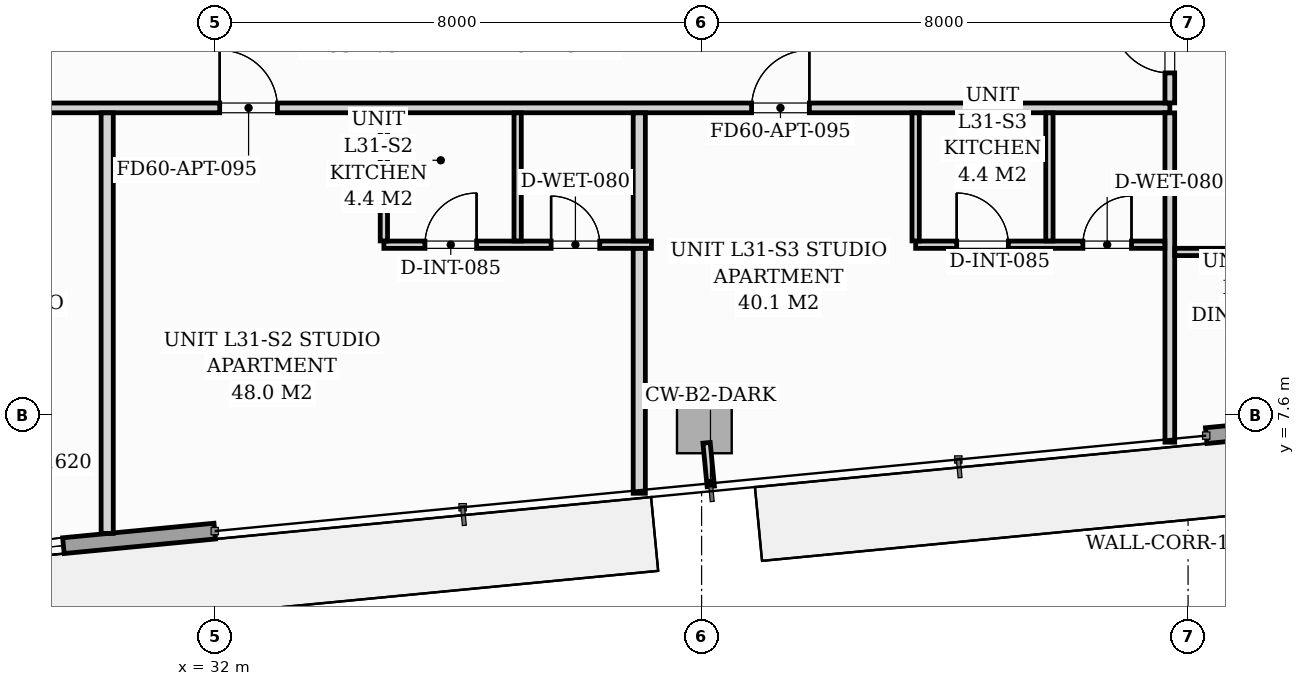
"""IFC4 building model, lengths in metres.
Left out: names, types, materials, properties, quantities, classifications, styles, units other than length and angle.
Written with IfcOpenShell. Run it as: python <this file> out.ifc"""

import sys

from ifc_helpers import new_model, si_unit, direction, frame, frame_2d, origin, origin_2d, place, context, subcontext, project, spatial, rectangle, extrude, source, transform, mapped, element, fill, save


model = new_model("IFC4")
c1 = context("Model", 3, precision=1e-05, world=origin(), true_north=direction((0.0, 1.0)))
c2 = subcontext(c1, "Body", "Model", "MODEL_VIEW")
j1 = project(units=[si_unit("LENGTHUNIT", "METRE"), si_unit("PLANEANGLEUNIT", "RADIAN")], contexts=[c1])
p1 = place(None, origin())
s1 = spatial("IfcSite", under=j1, at=p1, CompositionType="ELEMENT")
p2 = place(p1, origin())
s2 = spatial("IfcBuilding", under=s1, at=p2, CompositionType="ELEMENT")
p3 = place(p2, frame((0.0, 0.0, 109.8)))
s3 = spatial("IfcBuildingStorey", under=s2, at=p3, CompositionType="ELEMENT", Elevation=109.8)
m1 = source(origin(), c2, "Body", "SweptSolid", [
    extrude(rectangle(XDim=0.9, YDim=1.1, at=origin_2d()), origin(), (0.0, 0.0, 1.0), 3.196),
])
p4 = place(p3, frame((40.045, 7.521, 0.002), z_axis=(0.0, 0.0, 1.0), x_axis=(0.995396198367, 0.09584575252, 0.0)))
e1 = element("IfcColumn", 1, at=p4, inside=s3, PredefinedType="COLUMN", context=c2, shape_type="MappedRepresentation", body=[
    mapped(m1, transform((0.0, 0.0, 0.0), scale=1.0)),
])
p5 = place(p3, frame((67.32, 9.092, 0.0), z_axis=(0.0, 0.0, 1.0), x_axis=(-0.995396521236, -0.095842399342, 0.0)))
e2 = element("IfcWall", 2, at=p5, inside=s3, PredefinedType="STANDARD", context=c2, shape_type="SweptSolid", body=[
    extrude(rectangle(XDim=19.11, YDim=0.26, at=frame_2d((9.555, 0.0))), origin(), (0.0, 0.0, 1.0), 2.94),
])
p6 = place(p5, frame((9.774, 0.0, 0.0)))
e3 = element("IfcOpeningElement", 3, at=p6, cuts=e2, PredefinedType="OPENING", context=c2, shape_type="SweptSolid", body=[
    extrude(rectangle(XDim=1.8, YDim=2.06, at=frame_2d((0.9, 1.03))), frame((0.0, 0.14, 0.0), z_axis=(0.0, -1.0, 0.0), x_axis=(1.0, 0.0, 0.0)), (0.0, 0.0, 1.0), 0.28),
])
p7 = place(p5, frame((2.05, 0.0, 0.65)))
e4 = element("IfcOpeningElement", 4, at=p7, cuts=e2, PredefinedType="OPENING", context=c2, shape_type="SweptSolid", body=[
    extrude(rectangle(XDim=1.6, YDim=1.5, at=frame_2d((0.8, 0.75))), frame((0.0, 0.14, 0.0), z_axis=(0.0, -1.0, 0.0), x_axis=(1.0, 0.0, 0.0)), (0.0, 0.0, 1.0), 0.28),
])
p8 = place(p3, frame((31.994, 5.69, 0.0), z_axis=(0.0, 0.0, 1.0), x_axis=(-0.995396521236, -0.095842399342, 0.0)))
e5 = element("IfcWall", 5, at=p8, inside=s3, PredefinedType="STANDARD", context=c2, shape_type="SweptSolid", body=[
    extrude(rectangle(XDim=19.11, YDim=0.26, at=frame_2d((9.555, 0.0))), origin(), (0.0, 0.0, 1.0), 2.94),
])
p9 = place(p8, frame((8.05, 0.0, 0.0)))
e6 = element("IfcOpeningElement", 6, at=p9, cuts=e5, PredefinedType="OPENING", context=c2, shape_type="SweptSolid", body=[
    extrude(rectangle(XDim=1.8, YDim=2.06, at=frame_2d((0.9, 1.03))), frame((0.0, 0.14, 0.0), z_axis=(0.0, -1.0, 0.0), x_axis=(1.0, 0.0, 0.0)), (0.0, 0.0, 1.0), 0.28),
])
p10 = place(p8, frame((2.5, 0.0, 0.65)))
e7 = element("IfcOpeningElement", 7, at=p10, cuts=e5, PredefinedType="OPENING", context=c2, shape_type="SweptSolid", body=[
    extrude(rectangle(XDim=1.6, YDim=1.5, at=frame_2d((0.8, 0.75))), frame((0.0, 0.14, 0.0), z_axis=(0.0, -1.0, 0.0), x_axis=(1.0, 0.0, 0.0)), (0.0, 0.0, 1.0), 0.28),
])
p11 = place(p3, frame((21.5, 12.65, 0.0), z_axis=(0.0, 0.0, 1.0), x_axis=(1.0, 0.0, 0.0)))
e8 = element("IfcWall", 8, at=p11, inside=s3, PredefinedType="PARTITIONING", context=c2, shape_type="SweptSolid", body=[
    extrude(rectangle(XDim=26.2, YDim=0.16, at=frame_2d((13.1, 0.0))), origin(), (0.0, 0.0, 1.0), 2.94),
])
p12 = place(p11, frame((5.927, 0.0, 0.0)))
e9 = element("IfcOpeningElement", 9, at=p12, cuts=e8, PredefinedType="OPENING", context=c2, shape_type="SweptSolid", body=[
    extrude(rectangle(XDim=0.95, YDim=2.06, at=frame_2d((0.475, 1.03))), frame((0.0, 0.09, 0.0), z_axis=(0.0, -1.0, 0.0), x_axis=(1.0, 0.0, 0.0)), (0.0, 0.0, 1.0), 0.18),
])
p13 = place(p11, frame((10.575, 0.0, 0.0)))
e10 = element("IfcOpeningElement", 10, at=p13, cuts=e8, PredefinedType="OPENING", context=c2, shape_type="SweptSolid", body=[
    extrude(rectangle(XDim=0.95, YDim=2.06, at=frame_2d((0.475, 1.03))), frame((0.0, 0.09, 0.0), z_axis=(0.0, -1.0, 0.0), x_axis=(1.0, 0.0, 0.0)), (0.0, 0.0, 1.0), 0.18),
])
p14 = place(p11, frame((19.322, 0.0, 0.0)))
e11 = element("IfcOpeningElement", 11, at=p14, cuts=e8, PredefinedType="OPENING", context=c2, shape_type="SweptSolid", body=[
    extrude(rectangle(XDim=0.95, YDim=2.06, at=frame_2d((0.475, 1.03))), frame((0.0, 0.09, 0.0), z_axis=(0.0, -1.0, 0.0), x_axis=(1.0, 0.0, 0.0)), (0.0, 0.0, 1.0), 0.18),
])
p15 = place(p3, frame((47.7, 7.153, 0.0), z_axis=(0.0, 0.0, 1.0), x_axis=(0.0, 1.0, 0.0)))
e12 = element("IfcWall", 12, at=p15, inside=s3, PredefinedType="PARTITIONING", context=c2, shape_type="SweptSolid", body=[
    extrude(rectangle(XDim=5.416, YDim=0.16, at=frame_2d((2.708, 0.0))), origin(), (0.0, 0.0, 1.0), 2.94),
])
p16 = place(p3, frame((47.7, 12.732, 0.0), z_axis=(0.0, 0.0, 1.0), x_axis=(0.0, 1.0, 0.0)))
e13 = element("IfcWall", 13, at=p16, inside=s3, PredefinedType="PARTITIONING", context=c2, shape_type="SweptSolid", body=[
    extrude(rectangle(XDim=7.918, YDim=0.16, at=frame_2d((3.959, 0.0))), origin(), (0.0, 0.0, 1.0), 2.94),
])
p17 = place(p16, frame((0.493, 0.0, 0.0)))
e14 = element("IfcOpeningElement", 14, at=p17, cuts=e13, PredefinedType="OPENING", context=c2, shape_type="SweptSolid", body=[
    extrude(rectangle(XDim=0.95, YDim=2.06, at=frame_2d((0.475, 1.03))), frame((0.0, 0.09, 0.0), z_axis=(0.0, -1.0, 0.0), x_axis=(1.0, 0.0, 0.0)), (0.0, 0.0, 1.0), 0.18),
])
p18 = place(p16, frame((6.311, 0.0, 0.0)))
e15 = element("IfcOpeningElement", 15, at=p18, cuts=e13, PredefinedType="OPENING", context=c2, shape_type="SweptSolid", body=[
    extrude(rectangle(XDim=0.95, YDim=2.06, at=frame_2d((0.475, 1.03))), frame((0.0, 0.09, 0.0), z_axis=(0.0, -1.0, 0.0), x_axis=(1.0, 0.0, 0.0)), (0.0, 0.0, 1.0), 0.18),
])
p19 = place(p3, frame((30.225, 5.653, 0.0), z_axis=(0.0, 0.0, 1.0), x_axis=(0.0, 1.0, 0.0)))
e16 = element("IfcWall", 16, at=p19, inside=s3, PredefinedType="PARTITIONING", context=c2, shape_type="SweptSolid", body=[
    extrude(rectangle(XDim=6.916, YDim=0.2, at=frame_2d((3.458, 0.0))), origin(), (0.0, 0.0, 1.0), 2.94),
])
p20 = place(p3, frame((34.775, 10.4, 0.0), z_axis=(0.0, 0.0, 1.0), x_axis=(1.0, 0.0, 0.0)))
e17 = element("IfcWall", 17, at=p20, inside=s3, PredefinedType="PARTITIONING", context=c2, shape_type="SweptSolid", body=[
    extrude(rectangle(XDim=4.4, YDim=0.12, at=frame_2d((2.2, 0.0))), origin(), (0.0, 0.0, 1.0), 2.94),
])
p21 = place(p20, frame((0.675, 0.0, 0.0)))
e18 = element("IfcOpeningElement", 18, at=p21, cuts=e17, PredefinedType="OPENING", context=c2, shape_type="SweptSolid", body=[
    extrude(rectangle(XDim=0.85, YDim=2.05, at=frame_2d((0.425, 1.025))), frame((0.0, 0.07, 0.0), z_axis=(0.0, -1.0, 0.0), x_axis=(1.0, 0.0, 0.0)), (0.0, 0.0, 1.0), 0.14),
])
p22 = place(p20, frame((2.75, 0.0, 0.0)))
e19 = element("IfcOpeningElement", 19, at=p22, cuts=e17, PredefinedType="OPENING", context=c2, shape_type="SweptSolid", body=[
    extrude(rectangle(XDim=0.8, YDim=2.02, at=frame_2d((0.4, 1.01))), frame((0.0, 0.07, 0.0), z_axis=(0.0, -1.0, 0.0), x_axis=(1.0, 0.0, 0.0)), (0.0, 0.0, 1.0), 0.14),
])
for number, where, z_axis, x_axis in (
    (20, (34.775, 10.462, 0.0), (0.0, 0.0, 1.0), (0.0, 1.0, 0.0)),
    (21, (36.975, 10.462, 0.0), (0.0, 0.0, 1.0), (0.0, 1.0, 0.0)),
):
    element("IfcWall", number, at=place(p3, frame(where, z_axis=z_axis, x_axis=x_axis)), inside=s3, PredefinedType="PARTITIONING", context=c2, shape_type="SweptSolid", body=[
        extrude(rectangle(XDim=2.106, YDim=0.12, at=frame_2d((1.053, 0.0))), origin(), (0.0, 0.0, 1.0), 2.94),
    ])
p23 = place(p3, frame((38.975, 6.312, 0.0), z_axis=(0.0, 0.0, 1.0), x_axis=(0.0, 1.0, 0.0)))
e22 = element("IfcWall", 22, at=p23, inside=s3, PredefinedType="PARTITIONING", context=c2, shape_type="SweptSolid", body=[
    extrude(rectangle(XDim=4.025, YDim=0.2, at=frame_2d((2.013, 0.0))), origin(), (0.0, 0.0, 1.0), 2.94),
])
p24 = place(p3, frame((38.975, 10.462, 0.0), z_axis=(0.0, 0.0, 1.0), x_axis=(0.0, 1.0, 0.0)))
e23 = element("IfcWall", 23, at=p24, inside=s3, PredefinedType="PARTITIONING", context=c2, shape_type="SweptSolid", body=[
    extrude(rectangle(XDim=2.106, YDim=0.2, at=frame_2d((1.053, 0.0))), origin(), (0.0, 0.0, 1.0), 2.94),
])
p25 = place(p3, frame((43.52, 10.4, 0.0), z_axis=(0.0, 0.0, 1.0), x_axis=(1.0, 0.0, 0.0)))
e24 = element("IfcWall", 24, at=p25, inside=s3, PredefinedType="PARTITIONING", context=c2, shape_type="SweptSolid", body=[
    extrude(rectangle(XDim=4.098, YDim=0.12, at=frame_2d((2.049, 0.0))), origin(), (0.0, 0.0, 1.0), 2.94),
])
p26 = place(p25, frame((0.675, 0.0, 0.0)))
e25 = element("IfcOpeningElement", 25, at=p26, cuts=e24, PredefinedType="OPENING", context=c2, shape_type="SweptSolid", body=[
    extrude(rectangle(XDim=0.85, YDim=2.05, at=frame_2d((0.425, 1.025))), frame((0.0, 0.07, 0.0), z_axis=(0.0, -1.0, 0.0), x_axis=(1.0, 0.0, 0.0)), (0.0, 0.0, 1.0), 0.14),
])
p27 = place(p25, frame((2.75, 0.0, 0.0)))
e26 = element("IfcOpeningElement", 26, at=p27, cuts=e24, PredefinedType="OPENING", context=c2, shape_type="SweptSolid", body=[
    extrude(rectangle(XDim=0.8, YDim=2.02, at=frame_2d((0.4, 1.01))), frame((0.0, 0.07, 0.0), z_axis=(0.0, -1.0, 0.0), x_axis=(1.0, 0.0, 0.0)), (0.0, 0.0, 1.0), 0.14),
])
for number, where, z_axis, x_axis in (
    (27, (43.52, 10.462, 0.0), (0.0, 0.0, 1.0), (0.0, 1.0, 0.0)),
    (28, (45.72, 10.462, 0.0), (0.0, 0.0, 1.0), (0.0, 1.0, 0.0)),
):
    element("IfcWall", number, at=place(p3, frame(where, z_axis=z_axis, x_axis=x_axis)), inside=s3, PredefinedType="PARTITIONING", context=c2, shape_type="SweptSolid", body=[
        extrude(rectangle(XDim=2.106, YDim=0.12, at=frame_2d((1.053, 0.0))), origin(), (0.0, 0.0, 1.0), 2.94),
    ])
p28 = place(p3, frame((47.782, 10.281, 0.0), z_axis=(0.0, 0.0, 1.0), x_axis=(1.0, 0.0, 0.0)))
e29 = element("IfcWall", 29, at=p28, inside=s3, PredefinedType="PARTITIONING", context=c2, shape_type="SweptSolid", body=[
    extrude(rectangle(XDim=18.472, YDim=0.12, at=frame_2d((9.236, 0.0))), origin(), (0.0, 0.0, 1.0), 2.94),
])
p29 = place(p28, frame((8.811, 0.0, 0.0)))
e30 = element("IfcOpeningElement", 30, at=p29, cuts=e29, PredefinedType="OPENING", context=c2, shape_type="SweptSolid", body=[
    extrude(rectangle(XDim=0.85, YDim=2.05, at=frame_2d((0.425, 1.025))), frame((0.0, 0.07, 0.0), z_axis=(0.0, -1.0, 0.0), x_axis=(1.0, 0.0, 0.0)), (0.0, 0.0, 1.0), 0.14),
])
p30 = place(p3, frame((40.082, 7.142, 0.0), z_axis=(0.0, 0.0, 1.0), x_axis=(0.095944965663, -0.995386640238, 0.0)))
e31 = element("IfcWall", 31, at=p30, inside=s3, PredefinedType="PARTITIONING", context=c2, shape_type="SweptSolid", body=[
    extrude(rectangle(XDim=0.72, YDim=0.12, at=frame_2d((0.36, 0.0))), origin(), (0.0, 0.0, 1.0), 2.94),
])
m2 = source(origin(), c2, "Body", "SweptSolid", [
    extrude(rectangle(XDim=1.6, YDim=1.5, at=frame_2d((0.8, 0.75))), frame((0.0, 0.03, 0.0), z_axis=(0.0, -1.0, 0.0), x_axis=(1.0, 0.0, 0.0)), (0.0, 0.0, 1.0), 0.06),
])
p31 = place(p10, origin())
e32 = element("IfcWindow", 32, at=p31, inside=s3, PartitioningType="SINGLE_PANEL", PredefinedType="WINDOW", context=c2, shape_type="MappedRepresentation", body=[
    mapped(m2, transform((0.0, 0.0, 0.0), scale=1.0)),
])
fill(e7, e32)
m3 = source(origin(), c2, "Body", "SweptSolid", [
    extrude(rectangle(XDim=0.95, YDim=2.06, at=frame_2d((0.475, 1.03))), frame((0.0, 0.025, 0.0), z_axis=(0.0, -1.0, 0.0), x_axis=(1.0, 0.0, 0.0)), (0.0, 0.0, 1.0), 0.05),
])
p32 = place(p13, origin())
e33 = element("IfcDoor", 33, at=p32, inside=s3, OperationType="SINGLE_SWING_LEFT", PredefinedType="DOOR", context=c2, shape_type="MappedRepresentation", body=[
    mapped(m3, transform((0.0, 0.0, 0.0), scale=1.0)),
])
fill(e10, e33)
m4 = source(origin(), c2, "Body", "SweptSolid", [
    extrude(rectangle(XDim=0.85, YDim=2.05, at=frame_2d((0.425, 1.025))), frame((0.0, 0.025, 0.0), z_axis=(0.0, -1.0, 0.0), x_axis=(1.0, 0.0, 0.0)), (0.0, 0.0, 1.0), 0.05),
])
p33 = place(p21, origin())
e34 = element("IfcDoor", 34, at=p33, inside=s3, OperationType="SINGLE_SWING_RIGHT", PredefinedType="DOOR", context=c2, shape_type="MappedRepresentation", body=[
    mapped(m4, transform((0.0, 0.0, 0.0), scale=1.0)),
])
fill(e18, e34)
m5 = source(origin(), c2, "Body", "SweptSolid", [
    extrude(rectangle(XDim=0.8, YDim=2.02, at=frame_2d((0.4, 1.01))), frame((0.0, 0.025, 0.0), z_axis=(0.0, -1.0, 0.0), x_axis=(1.0, 0.0, 0.0)), (0.0, 0.0, 1.0), 0.05),
])
p34 = place(p22, origin())
e35 = element("IfcDoor", 35, at=p34, inside=s3, OperationType="SINGLE_SWING_LEFT", PredefinedType="DOOR", context=c2, shape_type="MappedRepresentation", body=[
    mapped(m5, transform((0.0, 0.0, 0.0), scale=1.0)),
])
fill(e19, e35)
p35 = place(p14, origin())
e36 = element("IfcDoor", 36, at=p35, inside=s3, OperationType="SINGLE_SWING_RIGHT", PredefinedType="DOOR", context=c2, shape_type="MappedRepresentation", body=[
    mapped(m3, transform((0.0, 0.0, 0.0), scale=1.0)),
])
fill(e11, e36)
p36 = place(p26, origin())
e37 = element("IfcDoor", 37, at=p36, inside=s3, OperationType="SINGLE_SWING_LEFT", PredefinedType="DOOR", context=c2, shape_type="MappedRepresentation", body=[
    mapped(m4, transform((0.0, 0.0, 0.0), scale=1.0)),
])
fill(e25, e37)
p37 = place(p27, origin())
e38 = element("IfcDoor", 38, at=p37, inside=s3, OperationType="SINGLE_SWING_RIGHT", PredefinedType="DOOR", context=c2, shape_type="MappedRepresentation", body=[
    mapped(m5, transform((0.0, 0.0, 0.0), scale=1.0)),
])
fill(e26, e38)
p38 = place(p17, origin())
e39 = element("IfcDoor", 39, at=p38, inside=s3, OperationType="SINGLE_SWING_RIGHT", PredefinedType="DOOR", context=c2, shape_type="MappedRepresentation", body=[
    mapped(m3, transform((0.0, 0.0, 0.0), scale=1.0)),
])
fill(e14, e39)
save(model, sys.argv[1])
